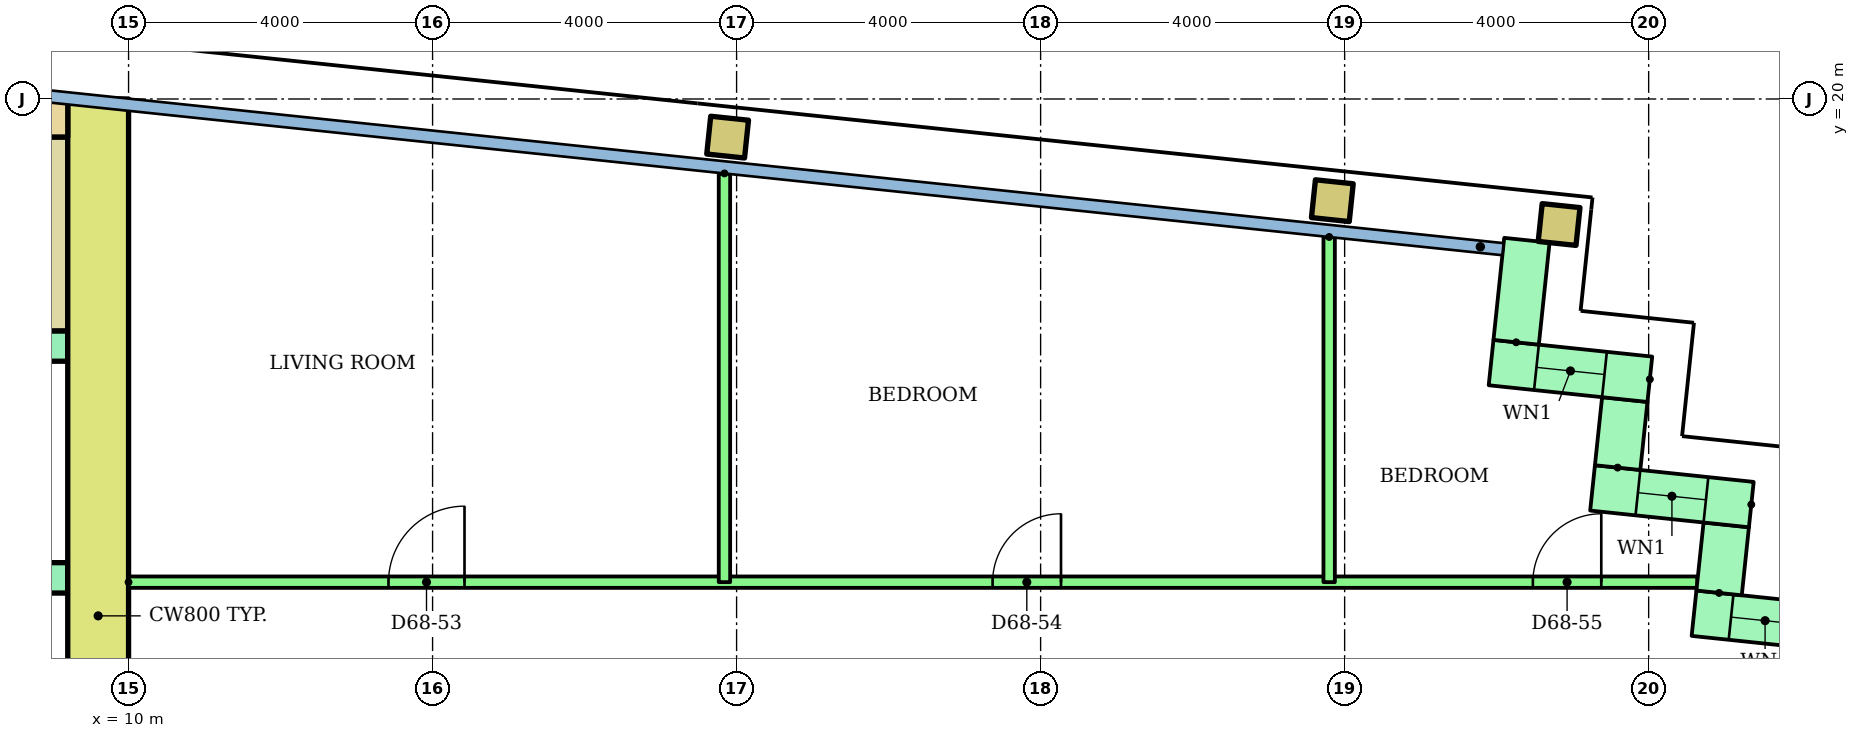
"""IFC4 building model, lengths in metres.
Left out: names, types, materials, properties, quantities, classifications, styles, units other than length and angle.
Written with IfcOpenShell. Run it as: python <this file> out.ifc"""

import sys

from ifc_helpers import new_model, si_unit, direction, frame, frame_2d, origin, origin_2d, place, context, subcontext, project, spatial, rectangle, hollow_rectangle, extrude, element, fill, save


model = new_model("IFC4")
c1 = context("Model", 3, precision=1e-05, world=origin(), true_north=direction((0.0, 1.0)))
c2 = subcontext(c1, "Body", "Model", "MODEL_VIEW")
j1 = project(units=[si_unit("LENGTHUNIT", "METRE"), si_unit("PLANEANGLEUNIT", "RADIAN")], contexts=[c1])
p1 = place(None, origin())
s1 = spatial("IfcSite", under=j1, at=p1, CompositionType="ELEMENT")
p2 = place(p1, origin())
s2 = spatial("IfcBuilding", under=s1, at=p2, CompositionType="ELEMENT")
p3 = place(p2, frame((0.0, 0.0, 262.7)))
s3 = spatial("IfcBuildingStorey", under=s2, at=p3, CompositionType="ELEMENT", Elevation=262.7)
for number, where, z_axis, x_axis in (
    (1, (17.882, 19.498, 0.0), (0.0, 0.0, 1.0), (0.995, -0.105, 0.0)),
    (2, (25.838, 18.662, 0.0), (0.0, 0.0, 1.0), (0.995, -0.105, 0.0)),
    (3, (28.822, 18.349, 0.0), (0.0, 0.0, 1.0), (0.995, -0.105, 0.0)),
):
    element("IfcColumn", number, at=place(p3, frame(where, z_axis=z_axis, x_axis=x_axis)), inside=s3, PredefinedType="COLUMN", context=c2, shape_type="SweptSolid", body=[
        extrude(hollow_rectangle(XDim=0.5, YDim=0.5, WallThickness=0.025, at=origin_2d()), origin(), (0.0, 0.0, 1.0), 3.2),
    ])
p4 = place(p3, frame((32.536, 13.031, 0.0), z_axis=(0.0, 0.0, 1.0), x_axis=(-0.994534226826, 0.104411070641, 0.0)))
e4 = element("IfcWall", 4, at=p4, inside=s3, PredefinedType="STANDARD", context=c2, shape_type="SweptSolid", body=[
    extrude(rectangle(XDim=1.95, YDim=0.6, at=frame_2d((0.975, 0.0))), origin(), (0.0, 0.0, 1.0), 2.92),
])
p5 = place(p4, frame((0.56, 0.0, 0.9)))
e5 = element("IfcOpeningElement", 5, at=p5, cuts=e4, PredefinedType="OPENING", context=c2, shape_type="SweptSolid", body=[
    extrude(rectangle(XDim=0.9, YDim=1.5, at=frame_2d((0.45, 0.75))), frame((0.0, 0.31, 0.0), z_axis=(0.0, -1.0, 0.0), x_axis=(1.0, 0.0, 0.0)), (0.0, 0.0, 1.0), 0.62),
])
p6 = place(p3, frame((30.927, 13.502, 0.0), z_axis=(0.0, 0.0, 1.0), x_axis=(0.104416541099, 0.994533652495, 0.0)))
e6 = element("IfcWall", 6, at=p6, inside=s3, PredefinedType="STANDARD", context=c2, shape_type="SweptSolid", body=[
    extrude(rectangle(XDim=0.9, YDim=0.6, at=frame_2d((0.45, 0.0))), origin(), (0.0, 0.0, 1.0), 2.92),
])
p7 = place(p3, frame((31.351, 14.664, 0.0), z_axis=(0.0, 0.0, 1.0), x_axis=(-0.994523910136, 0.104509292252, 0.0)))
e7 = element("IfcWall", 7, at=p7, inside=s3, PredefinedType="STANDARD", context=c2, shape_type="SweptSolid", body=[
    extrude(rectangle(XDim=2.1, YDim=0.6, at=frame_2d((1.05, 0.0))), origin(), (0.0, 0.0, 1.0), 2.92),
])
p8 = place(p7, frame((0.6, 0.0, 0.9)))
e8 = element("IfcOpeningElement", 8, at=p8, cuts=e7, PredefinedType="OPENING", context=c2, shape_type="SweptSolid", body=[
    extrude(rectangle(XDim=0.9, YDim=1.5, at=frame_2d((0.45, 0.75))), frame((0.0, 0.31, 0.0), z_axis=(0.0, -1.0, 0.0), x_axis=(1.0, 0.0, 0.0)), (0.0, 0.0, 1.0), 0.62),
])
p9 = place(p3, frame((29.592, 15.151, 0.0), z_axis=(0.0, 0.0, 1.0), x_axis=(0.104444712852, 0.994530694326, 0.0)))
e9 = element("IfcWall", 9, at=p9, inside=s3, PredefinedType="STANDARD", context=c2, shape_type="SweptSolid", body=[
    extrude(rectangle(XDim=0.9, YDim=0.6, at=frame_2d((0.45, 0.0))), origin(), (0.0, 0.0, 1.0), 2.92),
])
p10 = place(p3, frame((30.015, 16.312, 0.0), z_axis=(0.0, 0.0, 1.0), x_axis=(-0.994510548187, 0.104636368175, 0.0)))
e10 = element("IfcWall", 10, at=p10, inside=s3, PredefinedType="STANDARD", context=c2, shape_type="SweptSolid", body=[
    extrude(rectangle(XDim=2.1, YDim=0.6, at=frame_2d((1.05, 0.0))), origin(), (0.0, 0.0, 1.0), 2.92),
])
p11 = place(p10, frame((0.6, 0.0, 0.9)))
e11 = element("IfcOpeningElement", 11, at=p11, cuts=e10, PredefinedType="OPENING", context=c2, shape_type="SweptSolid", body=[
    extrude(rectangle(XDim=0.9, YDim=1.5, at=frame_2d((0.45, 0.75))), frame((0.0, 0.31, 0.0), z_axis=(0.0, -1.0, 0.0), x_axis=(1.0, 0.0, 0.0)), (0.0, 0.0, 1.0), 0.62),
])
p12 = place(p3, frame((28.257, 16.799, 0.0), z_axis=(0.0, 0.0, 1.0), x_axis=(0.104534153452, 0.994521297289, 0.0)))
e12 = element("IfcWall", 12, at=p12, inside=s3, PredefinedType="STANDARD", context=c2, shape_type="SweptSolid", body=[
    extrude(rectangle(XDim=1.35, YDim=0.6, at=frame_2d((0.675, 0.0))), origin(), (0.0, 0.0, 1.0), 2.92),
])
p13 = place(p3, frame((9.6, 6.4, 0.0), z_axis=(0.0, 0.0, 1.0), x_axis=(0.0, 1.0, 0.0)))
e13 = element("IfcWall", 13, at=p13, inside=s3, PredefinedType="SHEAR", context=c2, shape_type="SweptSolid", body=[
    extrude(rectangle(XDim=13.6, YDim=0.8, at=frame_2d((6.8, 0.0))), origin(), (0.0, 0.0, 1.0), 2.92),
])
p14 = place(p3, frame((-9.2, 19.75, 0.0)))
e14 = element("IfcWall", 14, at=p14, inside=s3, PredefinedType="SHEAR", context=c2, shape_type="SweptSolid", body=[
    extrude(rectangle(XDim=18.4, YDim=0.5, at=frame_2d((9.2, 0.0))), origin(), (0.0, 0.0, 1.0), 2.92),
])
p15 = place(p3, frame((1.2, 13.7, 0.0)))
e15 = element("IfcWall", 15, at=p15, inside=s3, PredefinedType="SHEAR", context=c2, shape_type="SweptSolid", body=[
    extrude(rectangle(XDim=8.0, YDim=0.4, at=frame_2d((4.0, 0.0))), origin(), (0.0, 0.0, 1.0), 2.92),
])
p16 = place(p3, frame((-9.2, 16.75, 0.0)))
e16 = element("IfcWall", 16, at=p16, inside=s3, PredefinedType="SHEAR", context=c2, shape_type="SweptSolid", body=[
    extrude(rectangle(XDim=18.4, YDim=0.4, at=frame_2d((9.2, 0.0))), origin(), (0.0, 0.0, 1.0), 2.92),
])
p17 = place(p16, frame((0.1, 0.0, 0.0)))
e17 = element("IfcOpeningElement", 17, at=p17, cuts=e16, PredefinedType="OPENING", context=c2, shape_type="SweptSolid", body=[
    extrude(rectangle(XDim=0.95, YDim=2.1, at=frame_2d((0.475, 1.05))), frame((0.0, 0.21, 0.0), z_axis=(0.0, -1.0, 0.0), x_axis=(1.0, 0.0, 0.0)), (0.0, 0.0, 1.0), 0.42),
])
p18 = place(p16, frame((6.1, 0.0, 0.0)))
e18 = element("IfcOpeningElement", 18, at=p18, cuts=e16, PredefinedType="OPENING", context=c2, shape_type="SweptSolid", body=[
    extrude(rectangle(XDim=0.95, YDim=2.1, at=frame_2d((0.475, 1.05))), frame((0.0, 0.21, 0.0), z_axis=(0.0, -1.0, 0.0), x_axis=(1.0, 0.0, 0.0)), (0.0, 0.0, 1.0), 0.42),
])
p19 = place(p16, frame((12.1, 0.0, 0.0)))
e19 = element("IfcOpeningElement", 19, at=p19, cuts=e16, PredefinedType="OPENING", context=c2, shape_type="SweptSolid", body=[
    extrude(rectangle(XDim=0.95, YDim=2.1, at=frame_2d((0.475, 1.05))), frame((0.0, 0.21, 0.0), z_axis=(0.0, -1.0, 0.0), x_axis=(1.0, 0.0, 0.0)), (0.0, 0.0, 1.0), 0.42),
])
p20 = place(p3, frame((8.75, 16.95, 0.0), z_axis=(0.0, 0.0, 1.0), x_axis=(0.0, 1.0, 0.0)))
e20 = element("IfcWall", 20, at=p20, inside=s3, PredefinedType="SHEAR", context=c2, shape_type="SweptSolid", body=[
    extrude(rectangle(XDim=2.55, YDim=0.9, at=frame_2d((1.275, 0.0))), origin(), (0.0, 0.0, 1.0), 2.92),
])
p21 = place(p3, frame((10.0, 13.643, 0.0)))
e21 = element("IfcWall", 21, at=p21, inside=s3, PredefinedType="PARTITIONING", context=c2, shape_type="SweptSolid", body=[
    extrude(rectangle(XDim=20.641, YDim=0.15, at=frame_2d((10.32, 0.0))), origin(), (0.0, 0.0, 1.0), 2.4),
])
p22 = place(p21, frame((3.42, 0.0, 0.0)))
e22 = element("IfcOpeningElement", 22, at=p22, cuts=e21, PredefinedType="OPENING", context=c2, shape_type="SweptSolid", body=[
    extrude(rectangle(XDim=1.0, YDim=2.1, at=frame_2d((0.5, 1.05))), frame((0.0, 0.085, 0.0), z_axis=(0.0, -1.0, 0.0), x_axis=(1.0, 0.0, 0.0)), (0.0, 0.0, 1.0), 0.17),
])
p23 = place(p21, frame((11.368, 0.0, 0.0)))
e23 = element("IfcOpeningElement", 23, at=p23, cuts=e21, PredefinedType="OPENING", context=c2, shape_type="SweptSolid", body=[
    extrude(rectangle(XDim=0.9, YDim=2.1, at=frame_2d((0.45, 1.05))), frame((0.0, 0.085, 0.0), z_axis=(0.0, -1.0, 0.0), x_axis=(1.0, 0.0, 0.0)), (0.0, 0.0, 1.0), 0.17),
])
p24 = place(p21, frame((18.477, 0.0, 0.0)))
e24 = element("IfcOpeningElement", 24, at=p24, cuts=e21, PredefinedType="OPENING", context=c2, shape_type="SweptSolid", body=[
    extrude(rectangle(XDim=0.9, YDim=2.1, at=frame_2d((0.45, 1.05))), frame((0.0, 0.085, 0.0), z_axis=(0.0, -1.0, 0.0), x_axis=(1.0, 0.0, 0.0)), (0.0, 0.0, 1.0), 0.17),
])
p25 = place(p3, frame((17.84, 19.021, 0.0), z_axis=(0.0, 0.0, 1.0), x_axis=(0.0, -1.0, 0.0)))
e25 = element("IfcWall", 25, at=p25, inside=s3, PredefinedType="PARTITIONING", context=c2, shape_type="SweptSolid", body=[
    extrude(rectangle(XDim=5.378, YDim=0.15, at=frame_2d((2.689, 0.0))), origin(), (0.0, 0.0, 1.0), 2.4),
])
p26 = place(p3, frame((25.796, 18.185, 0.0), z_axis=(0.0, 0.0, 1.0), x_axis=(0.0, -1.0, 0.0)))
e26 = element("IfcWall", 26, at=p26, inside=s3, PredefinedType="PARTITIONING", context=c2, shape_type="SweptSolid", body=[
    extrude(rectangle(XDim=4.542, YDim=0.15, at=frame_2d((2.271, 0.0))), origin(), (0.0, 0.0, 1.0), 2.4),
])
p27 = place(p5, origin())
e27 = element("IfcWindow", 27, at=p27, inside=s3, PartitioningType="SINGLE_PANEL", PredefinedType="WINDOW", context=c2, shape_type="SweptSolid", body=[
    extrude(rectangle(XDim=0.9, YDim=1.5, at=frame_2d((0.45, 0.75))), frame((0.0, 0.03, 0.0), z_axis=(0.0, -1.0, 0.0), x_axis=(1.0, 0.0, 0.0)), (0.0, 0.0, 1.0), 0.06),
])
fill(e5, e27)
p28 = place(p8, origin())
e28 = element("IfcWindow", 28, at=p28, inside=s3, PartitioningType="SINGLE_PANEL", PredefinedType="WINDOW", context=c2, shape_type="SweptSolid", body=[
    extrude(rectangle(XDim=0.9, YDim=1.5, at=frame_2d((0.45, 0.75))), frame((0.0, 0.03, 0.0), z_axis=(0.0, -1.0, 0.0), x_axis=(1.0, 0.0, 0.0)), (0.0, 0.0, 1.0), 0.06),
])
fill(e8, e28)
p29 = place(p11, origin())
e29 = element("IfcWindow", 29, at=p29, inside=s3, PartitioningType="SINGLE_PANEL", PredefinedType="WINDOW", context=c2, shape_type="SweptSolid", body=[
    extrude(rectangle(XDim=0.9, YDim=1.5, at=frame_2d((0.45, 0.75))), frame((0.0, 0.03, 0.0), z_axis=(0.0, -1.0, 0.0), x_axis=(1.0, 0.0, 0.0)), (0.0, 0.0, 1.0), 0.06),
])
fill(e11, e29)
p30 = place(p22, origin())
e30 = element("IfcDoor", 30, at=p30, inside=s3, OperationType="SINGLE_SWING_RIGHT", PredefinedType="DOOR", context=c2, shape_type="SweptSolid", body=[
    extrude(rectangle(XDim=1.0, YDim=2.1, at=frame_2d((0.5, 1.05))), frame((0.0, 0.025, 0.0), z_axis=(0.0, -1.0, 0.0), x_axis=(1.0, 0.0, 0.0)), (0.0, 0.0, 1.0), 0.05),
])
fill(e22, e30)
p31 = place(p23, origin())
e31 = element("IfcDoor", 31, at=p31, inside=s3, OperationType="SINGLE_SWING_RIGHT", PredefinedType="DOOR", context=c2, shape_type="SweptSolid", body=[
    extrude(rectangle(XDim=0.9, YDim=2.1, at=frame_2d((0.45, 1.05))), frame((0.0, 0.025, 0.0), z_axis=(0.0, -1.0, 0.0), x_axis=(1.0, 0.0, 0.0)), (0.0, 0.0, 1.0), 0.05),
])
fill(e23, e31)
p32 = place(p24, origin())
e32 = element("IfcDoor", 32, at=p32, inside=s3, OperationType="SINGLE_SWING_RIGHT", PredefinedType="DOOR", context=c2, shape_type="SweptSolid", body=[
    extrude(rectangle(XDim=0.9, YDim=2.1, at=frame_2d((0.45, 1.05))), frame((0.0, 0.025, 0.0), z_axis=(0.0, -1.0, 0.0), x_axis=(1.0, 0.0, 0.0)), (0.0, 0.0, 1.0), 0.05),
])
fill(e24, e32)
save(model, sys.argv[1])
